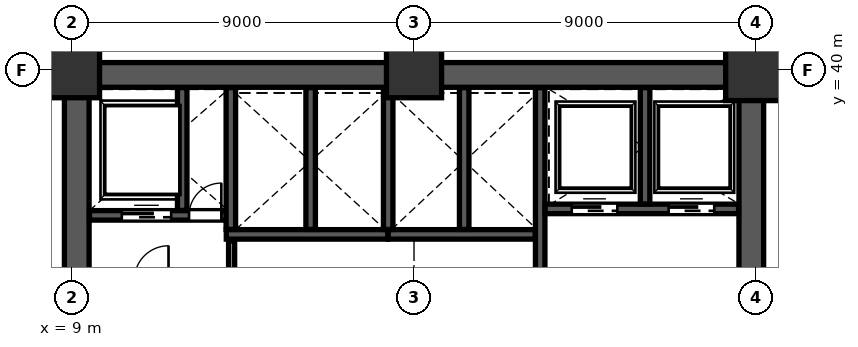
"""IFC4 building model, lengths in metres.
Left out: names, types, materials, properties, quantities, classifications, styles, units other than length and angle.
Written with IfcOpenShell. Run it as: python <this file> out.ifc"""

import sys

from ifc_helpers import new_model, si_unit, direction, frame, frame_2d, origin, origin_2d, place, context, subcontext, project, spatial, rectangle, extrude, source, transform, mapped, element, fill, save


model = new_model("IFC4")
c1 = context("Model", 3, precision=1e-05, world=origin(), true_north=direction((0.0, 1.0)))
c2 = subcontext(c1, "Body", "Model", "MODEL_VIEW")
j1 = project(units=[si_unit("LENGTHUNIT", "METRE"), si_unit("PLANEANGLEUNIT", "RADIAN")], contexts=[c1])
p1 = place(None, origin())
s1 = spatial("IfcSite", under=j1, at=p1, CompositionType="ELEMENT")
p2 = place(p1, origin())
s2 = spatial("IfcBuilding", under=s1, at=p2, CompositionType="ELEMENT")
p3 = place(p2, frame((0.0, 0.0, 12.0)))
s3 = spatial("IfcBuildingStorey", under=s2, at=p3, CompositionType="ELEMENT", Elevation=12.0)
m1 = source(origin(), c2, "Body", "SweptSolid", [
    extrude(rectangle(XDim=1.45, YDim=1.45, at=origin_2d()), origin(), (0.0, 0.0, 1.0), 5.398),
])
for number, where, z_axis, x_axis in (
    (1, (9.0, 40.0, 0.001), (0.0, 0.0, 1.0), (1.0, 0.0, 0.0)),
    (2, (18.0, 40.0, 0.001), (0.0, 0.0, 1.0), (1.0, 0.0, 0.0)),
):
    element("IfcColumn", number, at=place(p3, frame(where, z_axis=z_axis, x_axis=x_axis)), inside=s3, PredefinedType="COLUMN", context=c2, shape_type="MappedRepresentation", body=[
        mapped(m1, transform((0.0, 0.0, 0.0), scale=1.0)),
    ])
m2 = source(origin(), c2, "Body", "SweptSolid", [
    extrude(rectangle(XDim=1.6, YDim=1.6, at=origin_2d()), origin(), (0.0, 0.0, 1.0), 5.398),
])
p4 = place(p3, frame((27.0, 40.0, 0.001), z_axis=(0.0, 0.0, 1.0), x_axis=(1.0, 0.0, 0.0)))
e3 = element("IfcColumn", 3, at=p4, inside=s3, PredefinedType="COLUMN", context=c2, shape_type="MappedRepresentation", body=[
    mapped(m2, transform((0.0, 0.0, 0.0), scale=1.0)),
])
p5 = place(p3, frame((9.125, 24.45, 0.0), z_axis=(0.0, 0.0, 1.0), x_axis=(0.0, 1.0, 0.0)))
e4 = element("IfcWall", 4, at=p5, inside=s3, PredefinedType="SHEAR", context=c2, shape_type="SweptSolid", body=[
    extrude(rectangle(XDim=15.1, YDim=0.65, at=frame_2d((7.55, 0.0))), origin(), (0.0, 0.0, 1.0), 5.14),
])
p6 = place(p3, frame((26.875, 24.45, 0.0), z_axis=(0.0, 0.0, 1.0), x_axis=(0.0, 1.0, 0.0)))
e5 = element("IfcWall", 5, at=p6, inside=s3, PredefinedType="SHEAR", context=c2, shape_type="SweptSolid", body=[
    extrude(rectangle(XDim=15.1, YDim=0.65, at=frame_2d((7.55, 0.0))), origin(), (0.0, 0.0, 1.0), 5.14),
])
p7 = place(p6, frame((8.6, 0.0, 0.0)))
e6 = element("IfcOpeningElement", 6, at=p7, cuts=e5, PredefinedType="OPENING", context=c2, shape_type="SweptSolid", body=[
    extrude(rectangle(XDim=1.15, YDim=2.2, at=frame_2d((0.575, 1.1))), frame((0.0, 0.335, 0.0), z_axis=(0.0, -1.0, 0.0), x_axis=(1.0, 0.0, 0.0)), (0.0, 0.0, 1.0), 0.67),
])
p8 = place(p3, frame((8.8, 39.875, 0.0), z_axis=(0.0, 0.0, 1.0), x_axis=(1.0, 0.0, 0.0)))
e7 = element("IfcWall", 7, at=p8, inside=s3, PredefinedType="SHEAR", context=c2, shape_type="SweptSolid", body=[
    extrude(rectangle(XDim=18.4, YDim=0.65, at=frame_2d((9.2, 0.0))), origin(), (0.0, 0.0, 1.0), 5.14),
])
p9 = place(p3, frame((21.32, 32.12, 0.0), z_axis=(0.0, 0.0, 1.0), x_axis=(0.0, 1.0, 0.0)))
e8 = element("IfcWall", 8, at=p9, inside=s3, PredefinedType="SHEAR", context=c2, shape_type="SweptSolid", body=[
    extrude(rectangle(XDim=7.42, YDim=0.25, at=frame_2d((3.71, 0.0))), origin(), (0.0, 0.0, 1.0), 5.14),
])
p10 = place(p9, frame((1.4, 0.0, 0.0)))
e9 = element("IfcOpeningElement", 9, at=p10, cuts=e8, PredefinedType="OPENING", context=c2, shape_type="SweptSolid", body=[
    extrude(rectangle(XDim=1.15, YDim=2.2, at=frame_2d((0.575, 1.1))), frame((0.0, 0.135, 0.0), z_axis=(0.0, -1.0, 0.0), x_axis=(1.0, 0.0, 0.0)), (0.0, 0.0, 1.0), 0.27),
])
p11 = place(p3, frame((9.46, 36.18, 0.0), z_axis=(0.0, 0.0, 1.0), x_axis=(1.0, 0.0, 0.0)))
e10 = element("IfcWall", 10, at=p11, inside=s3, PredefinedType="SHEAR", context=c2, shape_type="SweptSolid", body=[
    extrude(rectangle(XDim=3.79, YDim=0.25, at=frame_2d((1.895, 0.0))), origin(), (0.0, 0.0, 1.0), 5.14),
])
p12 = place(p11, frame((2.62, 0.0, 0.0)))
e11 = element("IfcOpeningElement", 11, at=p12, cuts=e10, PredefinedType="OPENING", context=c2, shape_type="SweptSolid", body=[
    extrude(rectangle(XDim=0.85, YDim=2.1, at=frame_2d((0.425, 1.05))), frame((0.0, 0.135, 0.0), z_axis=(0.0, -1.0, 0.0), x_axis=(1.0, 0.0, 0.0)), (0.0, 0.0, 1.0), 0.27),
])
p13 = place(p11, frame((0.85, 0.0, 0.0)))
e12 = element("IfcOpeningElement", 12, at=p13, cuts=e10, PredefinedType="OPENING", context=c2, shape_type="SweptSolid", body=[
    extrude(rectangle(XDim=1.3, YDim=2.25, at=frame_2d((0.65, 1.125))), frame((0.0, 0.135, 0.0), z_axis=(0.0, -1.0, 0.0), x_axis=(1.0, 0.0, 0.0)), (0.0, 0.0, 1.0), 0.27),
])
p14 = place(p3, frame((11.9, 36.31, 0.0), z_axis=(0.0, 0.0, 1.0), x_axis=(0.0, 1.0, 0.0)))
e13 = element("IfcWall", 13, at=p14, inside=s3, PredefinedType="SHEAR", context=c2, shape_type="SweptSolid", body=[
    extrude(rectangle(XDim=3.23, YDim=0.25, at=frame_2d((1.615, 0.0))), origin(), (0.0, 0.0, 1.0), 5.14),
])
p15 = place(p3, frame((21.45, 36.35, 0.0), z_axis=(0.0, 0.0, 1.0), x_axis=(1.0, 0.0, 0.0)))
e14 = element("IfcWall", 14, at=p15, inside=s3, PredefinedType="SHEAR", context=c2, shape_type="SweptSolid", body=[
    extrude(rectangle(XDim=5.09, YDim=0.25, at=frame_2d((2.545, 0.0))), origin(), (0.0, 0.0, 1.0), 5.14),
])
p16 = place(p15, frame((0.7, 0.0, 0.0)))
e15 = element("IfcOpeningElement", 15, at=p16, cuts=e14, PredefinedType="OPENING", context=c2, shape_type="SweptSolid", body=[
    extrude(rectangle(XDim=1.2, YDim=2.2, at=frame_2d((0.6, 1.1))), frame((0.0, 0.135, 0.0), z_axis=(0.0, -1.0, 0.0), x_axis=(1.0, 0.0, 0.0)), (0.0, 0.0, 1.0), 0.27),
])
p17 = place(p15, frame((3.25, 0.0, 0.0)))
e16 = element("IfcOpeningElement", 16, at=p17, cuts=e14, PredefinedType="OPENING", context=c2, shape_type="SweptSolid", body=[
    extrude(rectangle(XDim=1.2, YDim=2.2, at=frame_2d((0.6, 1.1))), frame((0.0, 0.135, 0.0), z_axis=(0.0, -1.0, 0.0), x_axis=(1.0, 0.0, 0.0)), (0.0, 0.0, 1.0), 0.27),
])
p18 = place(p3, frame((24.08, 36.48, 0.0), z_axis=(0.0, 0.0, 1.0), x_axis=(0.0, 1.0, 0.0)))
e17 = element("IfcWall", 17, at=p18, inside=s3, PredefinedType="SHEAR", context=c2, shape_type="SweptSolid", body=[
    extrude(rectangle(XDim=3.06, YDim=0.25, at=frame_2d((1.53, 0.0))), origin(), (0.0, 0.0, 1.0), 5.14),
])
p19 = place(p3, frame((13.06, 35.68, 0.0), z_axis=(0.0, 0.0, 1.0), x_axis=(1.0, 0.0, 0.0)))
e18 = element("IfcWall", 18, at=p19, inside=s3, PredefinedType="SHEAR", context=c2, shape_type="SweptSolid", body=[
    extrude(rectangle(XDim=4.25, YDim=0.25, at=frame_2d((2.125, 0.0))), origin(), (0.0, 0.0, 1.0), 5.14),
])
for number, where, z_axis, x_axis in (
    (19, (13.18, 35.81, 0.0), (0.0, 0.0, 1.0), (0.0, 1.0, 0.0)),
    (20, (15.28, 35.81, 0.0), (0.0, 0.0, 1.0), (0.0, 1.0, 0.0)),
):
    element("IfcWall", number, at=place(p3, frame(where, z_axis=z_axis, x_axis=x_axis)), inside=s3, PredefinedType="SHEAR", context=c2, shape_type="SweptSolid", body=[
        extrude(rectangle(XDim=3.73, YDim=0.25, at=frame_2d((1.865, 0.0))), origin(), (0.0, 0.0, 1.0), 5.14),
    ])
p20 = place(p3, frame((17.32, 35.68, 0.0), z_axis=(0.0, 0.0, 1.0), x_axis=(1.0, 0.0, 0.0)))
e21 = element("IfcWall", 21, at=p20, inside=s3, PredefinedType="SHEAR", context=c2, shape_type="SweptSolid", body=[
    extrude(rectangle(XDim=3.87, YDim=0.25, at=frame_2d((1.935, 0.0))), origin(), (0.0, 0.0, 1.0), 5.14),
])
for number, where, z_axis, x_axis in (
    (22, (17.32, 35.81, 0.0), (0.0, 0.0, 1.0), (0.0, 1.0, 0.0)),
    (23, (19.32, 35.81, 0.0), (0.0, 0.0, 1.0), (0.0, 1.0, 0.0)),
):
    element("IfcWall", number, at=place(p3, frame(where, z_axis=z_axis, x_axis=x_axis)), inside=s3, PredefinedType="SHEAR", context=c2, shape_type="SweptSolid", body=[
        extrude(rectangle(XDim=3.73, YDim=0.25, at=frame_2d((1.865, 0.0))), origin(), (0.0, 0.0, 1.0), 5.14),
    ])
p21 = place(p3, frame((13.2, 34.57, 0.0), z_axis=(0.0, 0.0, 1.0), x_axis=(0.0, 1.0, 0.0)))
e24 = element("IfcWall", 24, at=p21, inside=s3, PredefinedType="PARTITIONING", context=c2, shape_type="SweptSolid", body=[
    extrude(rectangle(XDim=0.94, YDim=0.16, at=frame_2d((0.47, 0.0))), origin(), (0.0, 0.0, 1.0), 5.14),
])
m3 = source(origin(), c2, "Body", "SweptSolid", [
    extrude(rectangle(XDim=0.85, YDim=2.1, at=frame_2d((0.425, 1.05))), frame((0.0, 0.025, 0.0), z_axis=(0.0, -1.0, 0.0), x_axis=(1.0, 0.0, 0.0)), (0.0, 0.0, 1.0), 0.05),
])
p22 = place(p12, origin())
e25 = element("IfcDoor", 25, at=p22, inside=s3, OperationType="SINGLE_SWING_RIGHT", PredefinedType="DOOR", context=c2, shape_type="MappedRepresentation", body=[
    mapped(m3, transform((0.0, 0.0, 0.0), scale=1.0)),
])
fill(e11, e25)
m4 = source(origin(), c2, "Body", "SweptSolid", [
    extrude(rectangle(XDim=1.2, YDim=2.2, at=frame_2d((0.6, 1.1))), frame((0.0, 0.025, 0.0), z_axis=(0.0, -1.0, 0.0), x_axis=(1.0, 0.0, 0.0)), (0.0, 0.0, 1.0), 0.05),
])
p23 = place(p16, origin())
e26 = element("IfcDoor", 26, at=p23, inside=s3, OperationType="SLIDING_TO_LEFT", PredefinedType="DOOR", context=c2, shape_type="MappedRepresentation", body=[
    mapped(m4, transform((0.0, 0.0, 0.0), scale=1.0)),
])
fill(e15, e26)
p24 = place(p17, origin())
e27 = element("IfcDoor", 27, at=p24, inside=s3, OperationType="SLIDING_TO_RIGHT", PredefinedType="DOOR", context=c2, shape_type="MappedRepresentation", body=[
    mapped(m4, transform((0.0, 0.0, 0.0), scale=1.0)),
])
fill(e16, e27)
m5 = source(origin(), c2, "Body", "SweptSolid", [
    extrude(rectangle(XDim=1.3, YDim=2.25, at=frame_2d((0.65, 1.125))), frame((0.0, 0.025, 0.0), z_axis=(0.0, -1.0, 0.0), x_axis=(1.0, 0.0, 0.0)), (0.0, 0.0, 1.0), 0.05),
])
p25 = place(p13, origin())
e28 = element("IfcDoor", 28, at=p25, inside=s3, OperationType="SLIDING_TO_LEFT", PredefinedType="DOOR", context=c2, shape_type="MappedRepresentation", body=[
    mapped(m5, transform((0.0, 0.0, 0.0), scale=1.0)),
])
fill(e12, e28)
save(model, sys.argv[1])
